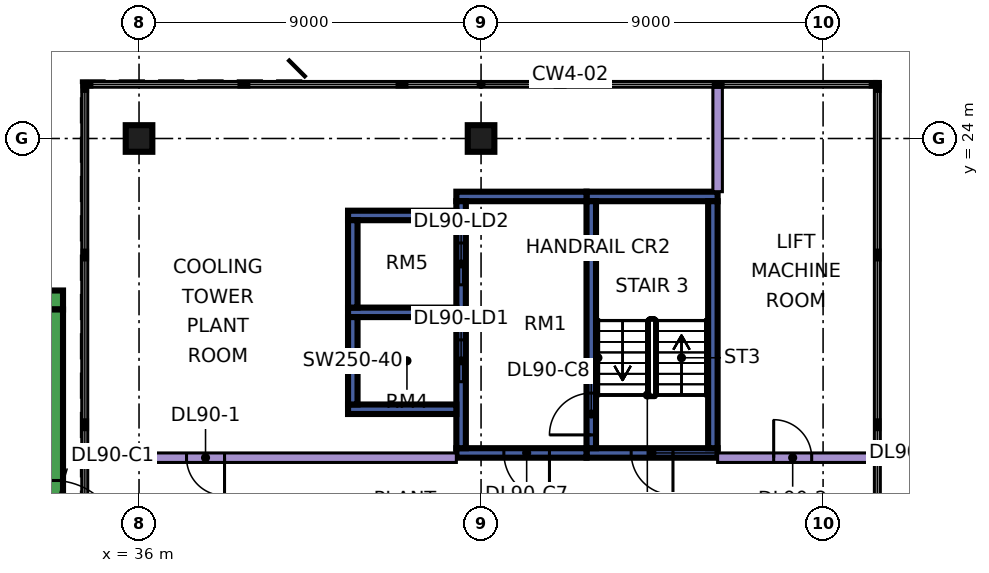
"""IFC4 building model, lengths in metres.
Left out: names, types, materials, properties, quantities, classifications, styles, units other than length and angle.
Written with IfcOpenShell. Run it as: python <this file> out.ifc"""

import sys

from ifc_helpers import new_model, si_unit, direction, frame, frame_2d, origin, origin_2d, place, context, subcontext, project, spatial, rectangle, extrude, element, fill, save


model = new_model("IFC4")
c1 = context("Model", 3, precision=1e-05, world=origin(), true_north=direction((0.0, 1.0)))
c2 = subcontext(c1, "Body", "Model", "MODEL_VIEW")
j1 = project(units=[si_unit("LENGTHUNIT", "METRE"), si_unit("PLANEANGLEUNIT", "RADIAN")], contexts=[c1])
p1 = place(None, origin())
s1 = spatial("IfcSite", under=j1, at=p1, CompositionType="ELEMENT")
p2 = place(p1, origin())
s2 = spatial("IfcBuilding", under=s1, at=p2, CompositionType="ELEMENT")
p3 = place(p2, frame((0.0, 0.0, 383.9)))
s3 = spatial("IfcBuildingStorey", under=s2, at=p3, CompositionType="ELEMENT", Elevation=383.9)
for number, where, z_axis, x_axis in (
    (1, (36.0, 24.0, 0.0), (0.0, 0.0, 1.0), (1.0, 0.0, 0.0)),
    (2, (45.0, 24.0, 0.0), (0.0, 0.0, 1.0), (1.0, 0.0, 0.0)),
):
    element("IfcColumn", number, at=place(p3, frame(where, z_axis=z_axis, x_axis=x_axis)), inside=s3, PredefinedType="COLUMN", context=c2, shape_type="SweptSolid", body=[
        extrude(rectangle(XDim=0.7, YDim=0.7, at=origin_2d()), origin(), (0.0, 0.0, 1.0), 5.0),
    ])
p4 = place(p3, frame((9.0, 19.75, 0.0), z_axis=(0.0, 0.0, 1.0), x_axis=(1.0, 0.0, 0.0)))
e3 = element("IfcWall", 3, at=p4, inside=s3, PredefinedType="SHEAR", context=c2, shape_type="SweptSolid", body=[
    extrude(rectangle(XDim=25.0, YDim=0.5, at=frame_2d((12.5, 0.0))), origin(), (0.0, 0.0, 1.0), 5.0),
])
p5 = place(p3, frame((33.75, 7.5, 0.0), z_axis=(0.0, 0.0, 1.0), x_axis=(0.0, 1.0, 0.0)))
e4 = element("IfcWall", 4, at=p5, inside=s3, PredefinedType="SHEAR", context=c2, shape_type="SweptSolid", body=[
    extrude(rectangle(XDim=12.0, YDim=0.5, at=frame_2d((6.0, 0.0))), origin(), (0.0, 0.0, 1.0), 5.0),
])
p6 = place(p5, frame((5.7, 0.0, 0.0)))
e5 = element("IfcOpeningElement", 5, at=p6, cuts=e4, PredefinedType="OPENING", context=c2, shape_type="SweptSolid", body=[
    extrude(rectangle(XDim=1.8, YDim=2.4, at=frame_2d((0.9, 1.2))), frame((0.0, 0.26, 0.0), z_axis=(0.0, -1.0, 0.0), x_axis=(1.0, 0.0, 0.0)), (0.0, 0.0, 1.0), 0.52),
])
p7 = place(p3, frame((47.775, 15.725, 0.0), z_axis=(0.0, 0.0, 1.0), x_axis=(1.0, 0.0, 0.0)))
e6 = element("IfcWall", 6, at=p7, inside=s3, PredefinedType="SHEAR", context=c2, shape_type="SweptSolid", body=[
    extrude(rectangle(XDim=3.45, YDim=0.25, at=frame_2d((1.725, 0.0))), origin(), (0.0, 0.0, 1.0), 5.0),
])
p8 = place(p7, frame((1.175, 0.0, 0.0)))
e7 = element("IfcOpeningElement", 7, at=p8, cuts=e6, PredefinedType="OPENING", context=c2, shape_type="SweptSolid", body=[
    extrude(rectangle(XDim=1.1, YDim=2.2, at=frame_2d((0.55, 1.1))), frame((0.0, 0.135, 0.0), z_axis=(0.0, -1.0, 0.0), x_axis=(1.0, 0.0, 0.0)), (0.0, 0.0, 1.0), 0.27),
])
p9 = place(p3, frame((47.775, 22.475, 0.0), z_axis=(0.0, 0.0, 1.0), x_axis=(1.0, 0.0, 0.0)))
e8 = element("IfcWall", 8, at=p9, inside=s3, PredefinedType="SHEAR", context=c2, shape_type="SweptSolid", body=[
    extrude(rectangle(XDim=3.45, YDim=0.25, at=frame_2d((1.725, 0.0))), origin(), (0.0, 0.0, 1.0), 5.0),
])
p10 = place(p3, frame((47.9, 15.85, 0.0), z_axis=(0.0, 0.0, 1.0), x_axis=(0.0, 1.0, 0.0)))
e9 = element("IfcWall", 9, at=p10, inside=s3, PredefinedType="SHEAR", context=c2, shape_type="SweptSolid", body=[
    extrude(rectangle(XDim=6.5, YDim=0.25, at=frame_2d((3.25, 0.0))), origin(), (0.0, 0.0, 1.0), 5.0),
])
p11 = place(p10, frame((0.35, 0.0, 0.0)))
e10 = element("IfcOpeningElement", 10, at=p11, cuts=e9, PredefinedType="OPENING", context=c2, shape_type="SweptSolid", body=[
    extrude(rectangle(XDim=1.1, YDim=2.2, at=frame_2d((0.55, 1.1))), frame((0.0, 0.135, 0.0), z_axis=(0.0, -1.0, 0.0), x_axis=(1.0, 0.0, 0.0)), (0.0, 0.0, 1.0), 0.27),
])
p12 = place(p3, frame((51.1, 15.85, 0.0), z_axis=(0.0, 0.0, 1.0), x_axis=(0.0, 1.0, 0.0)))
e11 = element("IfcWall", 11, at=p12, inside=s3, PredefinedType="SHEAR", context=c2, shape_type="SweptSolid", body=[
    extrude(rectangle(XDim=6.5, YDim=0.25, at=frame_2d((3.25, 0.0))), origin(), (0.0, 0.0, 1.0), 5.0),
])
p13 = place(p3, frame((44.35, 15.725, 0.0), z_axis=(0.0, 0.0, 1.0), x_axis=(1.0, 0.0, 0.0)))
e12 = element("IfcWall", 12, at=p13, inside=s3, PredefinedType="SHEAR", context=c2, shape_type="SweptSolid", body=[
    extrude(rectangle(XDim=3.425, YDim=0.25, at=frame_2d((1.712, 0.0))), origin(), (0.0, 0.0, 1.0), 5.0),
])
p14 = place(p13, frame((1.25, 0.0, 0.0)))
e13 = element("IfcOpeningElement", 13, at=p14, cuts=e12, PredefinedType="OPENING", context=c2, shape_type="SweptSolid", body=[
    extrude(rectangle(XDim=1.2, YDim=2.2, at=frame_2d((0.6, 1.1))), frame((0.0, 0.135, 0.0), z_axis=(0.0, -1.0, 0.0), x_axis=(1.0, 0.0, 0.0)), (0.0, 0.0, 1.0), 0.27),
])
p15 = place(p3, frame((44.35, 22.475, 0.0), z_axis=(0.0, 0.0, 1.0), x_axis=(1.0, 0.0, 0.0)))
e14 = element("IfcWall", 14, at=p15, inside=s3, PredefinedType="SHEAR", context=c2, shape_type="SweptSolid", body=[
    extrude(rectangle(XDim=3.425, YDim=0.25, at=frame_2d((1.712, 0.0))), origin(), (0.0, 0.0, 1.0), 5.0),
])
p16 = place(p3, frame((44.475, 15.85, 0.0), z_axis=(0.0, 0.0, 1.0), x_axis=(0.0, 1.0, 0.0)))
e15 = element("IfcWall", 15, at=p16, inside=s3, PredefinedType="SHEAR", context=c2, shape_type="SweptSolid", body=[
    extrude(rectangle(XDim=6.5, YDim=0.25, at=frame_2d((3.25, 0.0))), origin(), (0.0, 0.0, 1.0), 5.0),
])
p17 = place(p16, frame((1.75, 0.0, 0.0)))
e16 = element("IfcOpeningElement", 16, at=p17, cuts=e15, PredefinedType="OPENING", context=c2, shape_type="SweptSolid", body=[
    extrude(rectangle(XDim=1.1, YDim=2.2, at=frame_2d((0.55, 1.1))), frame((0.0, 0.135, 0.0), z_axis=(0.0, -1.0, 0.0), x_axis=(1.0, 0.0, 0.0)), (0.0, 0.0, 1.0), 0.27),
])
p18 = place(p16, frame((4.3, 0.0, 0.0)))
e17 = element("IfcOpeningElement", 17, at=p18, cuts=e15, PredefinedType="OPENING", context=c2, shape_type="SweptSolid", body=[
    extrude(rectangle(XDim=1.1, YDim=2.2, at=frame_2d((0.55, 1.1))), frame((0.0, 0.135, 0.0), z_axis=(0.0, -1.0, 0.0), x_axis=(1.0, 0.0, 0.0)), (0.0, 0.0, 1.0), 0.27),
])
for number, where, z_axis, x_axis in (
    (18, (41.5, 16.875, 0.0), (0.0, 0.0, 1.0), (1.0, 0.0, 0.0)),
    (19, (41.5, 19.425, 0.0), (0.0, 0.0, 1.0), (1.0, 0.0, 0.0)),
    (20, (41.5, 21.975, 0.0), (0.0, 0.0, 1.0), (1.0, 0.0, 0.0)),
):
    element("IfcWall", number, at=place(p3, frame(where, z_axis=z_axis, x_axis=x_axis)), inside=s3, PredefinedType="SHEAR", context=c2, shape_type="SweptSolid", body=[
        extrude(rectangle(XDim=2.85, YDim=0.25, at=frame_2d((1.425, 0.0))), origin(), (0.0, 0.0, 1.0), 5.0),
    ])
for number, where, z_axis, x_axis in (
    (21, (41.625, 17.0, 0.0), (0.0, 0.0, 1.0), (0.0, 1.0, 0.0)),
    (22, (41.625, 19.55, 0.0), (0.0, 0.0, 1.0), (0.0, 1.0, 0.0)),
):
    element("IfcWall", number, at=place(p3, frame(where, z_axis=z_axis, x_axis=x_axis)), inside=s3, PredefinedType="SHEAR", context=c2, shape_type="SweptSolid", body=[
        extrude(rectangle(XDim=2.3, YDim=0.25, at=frame_2d((1.15, 0.0))), origin(), (0.0, 0.0, 1.0), 5.0),
    ])
p19 = place(p3, frame((34.65, 15.6, 0.0), z_axis=(0.0, 0.0, 1.0), x_axis=(1.0, 0.0, 0.0)))
e23 = element("IfcWall", 23, at=p19, inside=s3, PredefinedType="PARTITIONING", context=c2, shape_type="SweptSolid", body=[
    extrude(rectangle(XDim=9.7, YDim=0.25, at=frame_2d((4.85, 0.0))), origin(), (0.0, 0.0, 1.0), 4.6),
])
p20 = place(p19, frame((2.6, 0.0, 0.0)))
e24 = element("IfcOpeningElement", 24, at=p20, cuts=e23, PredefinedType="OPENING", context=c2, shape_type="SweptSolid", body=[
    extrude(rectangle(XDim=1.0, YDim=2.1, at=frame_2d((0.5, 1.05))), frame((0.0, 0.135, 0.0), z_axis=(0.0, -1.0, 0.0), x_axis=(1.0, 0.0, 0.0)), (0.0, 0.0, 1.0), 0.27),
])
p21 = place(p3, frame((51.225, 15.6, 0.0), z_axis=(0.0, 0.0, 1.0), x_axis=(1.0, 0.0, 0.0)))
e25 = element("IfcWall", 25, at=p21, inside=s3, PredefinedType="PARTITIONING", context=c2, shape_type="SweptSolid", body=[
    extrude(rectangle(XDim=4.125, YDim=0.25, at=frame_2d((2.062, 0.0))), origin(), (0.0, 0.0, 1.0), 4.6),
])
p22 = place(p21, frame((1.475, 0.0, 0.0)))
e26 = element("IfcOpeningElement", 26, at=p22, cuts=e25, PredefinedType="OPENING", context=c2, shape_type="SweptSolid", body=[
    extrude(rectangle(XDim=1.0, YDim=2.1, at=frame_2d((0.5, 1.05))), frame((0.0, 0.135, 0.0), z_axis=(0.0, -1.0, 0.0), x_axis=(1.0, 0.0, 0.0)), (0.0, 0.0, 1.0), 0.27),
])
p23 = place(p3, frame((51.225, 22.6, 0.0), z_axis=(0.0, 0.0, 1.0), x_axis=(0.0, 1.0, 0.0)))
e27 = element("IfcWall", 27, at=p23, inside=s3, PredefinedType="PARTITIONING", context=c2, shape_type="SweptSolid", body=[
    extrude(rectangle(XDim=2.75, YDim=0.25, at=frame_2d((1.375, 0.0))), origin(), (0.0, 0.0, 1.0), 4.6),
])
p24 = place(p6, frame((1.8, 0.0, 0.0), z_axis=(0.0, 0.0, 1.0), x_axis=(-1.0, 0.0, 0.0)))
e28 = element("IfcDoor", 28, at=p24, inside=s3, OperationType="DOUBLE_DOOR_SINGLE_SWING", PredefinedType="DOOR", context=c2, shape_type="SweptSolid", body=[
    extrude(rectangle(XDim=1.8, YDim=2.4, at=frame_2d((0.9, 1.2))), frame((0.0, 0.025, 0.0), z_axis=(0.0, -1.0, 0.0), x_axis=(1.0, 0.0, 0.0)), (0.0, 0.0, 1.0), 0.05),
])
fill(e5, e28)
p25 = place(p8, origin())
e29 = element("IfcDoor", 29, at=p25, inside=s3, OperationType="SINGLE_SWING_RIGHT", PredefinedType="DOOR", context=c2, shape_type="SweptSolid", body=[
    extrude(rectangle(XDim=1.1, YDim=2.2, at=frame_2d((0.55, 1.1))), frame((0.0, 0.025, 0.0), z_axis=(0.0, -1.0, 0.0), x_axis=(1.0, 0.0, 0.0)), (0.0, 0.0, 1.0), 0.05),
])
fill(e7, e29)
p26 = place(p14, origin())
e30 = element("IfcDoor", 30, at=p26, inside=s3, OperationType="SINGLE_SWING_RIGHT", PredefinedType="DOOR", context=c2, shape_type="SweptSolid", body=[
    extrude(rectangle(XDim=1.2, YDim=2.2, at=frame_2d((0.6, 1.1))), frame((0.0, 0.025, 0.0), z_axis=(0.0, -1.0, 0.0), x_axis=(1.0, 0.0, 0.0)), (0.0, 0.0, 1.0), 0.05),
])
fill(e13, e30)
p27 = place(p11, origin())
e31 = element("IfcDoor", 31, at=p27, inside=s3, OperationType="SINGLE_SWING_LEFT", PredefinedType="DOOR", context=c2, shape_type="SweptSolid", body=[
    extrude(rectangle(XDim=1.1, YDim=2.2, at=frame_2d((0.55, 1.1))), frame((0.0, 0.025, 0.0), z_axis=(0.0, -1.0, 0.0), x_axis=(1.0, 0.0, 0.0)), (0.0, 0.0, 1.0), 0.05),
])
fill(e10, e31)
p28 = place(p17, origin())
e32 = element("IfcDoor", 32, at=p28, inside=s3, OperationType="DOUBLE_DOOR_SLIDING", PredefinedType="DOOR", context=c2, shape_type="SweptSolid", body=[
    extrude(rectangle(XDim=1.1, YDim=2.2, at=frame_2d((0.55, 1.1))), frame((0.0, 0.025, 0.0), z_axis=(0.0, -1.0, 0.0), x_axis=(1.0, 0.0, 0.0)), (0.0, 0.0, 1.0), 0.05),
])
fill(e16, e32)
p29 = place(p18, origin())
e33 = element("IfcDoor", 33, at=p29, inside=s3, OperationType="DOUBLE_DOOR_SLIDING", PredefinedType="DOOR", context=c2, shape_type="SweptSolid", body=[
    extrude(rectangle(XDim=1.1, YDim=2.2, at=frame_2d((0.55, 1.1))), frame((0.0, 0.025, 0.0), z_axis=(0.0, -1.0, 0.0), x_axis=(1.0, 0.0, 0.0)), (0.0, 0.0, 1.0), 0.05),
])
fill(e17, e33)
p30 = place(p20, origin())
e34 = element("IfcDoor", 34, at=p30, inside=s3, OperationType="SINGLE_SWING_RIGHT", PredefinedType="DOOR", context=c2, shape_type="SweptSolid", body=[
    extrude(rectangle(XDim=1.0, YDim=2.1, at=frame_2d((0.5, 1.05))), frame((0.0, 0.025, 0.0), z_axis=(0.0, -1.0, 0.0), x_axis=(1.0, 0.0, 0.0)), (0.0, 0.0, 1.0), 0.05),
])
fill(e24, e34)
p31 = place(p22, origin())
e35 = element("IfcDoor", 35, at=p31, inside=s3, OperationType="SINGLE_SWING_LEFT", PredefinedType="DOOR", context=c2, shape_type="SweptSolid", body=[
    extrude(rectangle(XDim=1.0, YDim=2.1, at=frame_2d((0.5, 1.05))), frame((0.0, 0.025, 0.0), z_axis=(0.0, -1.0, 0.0), x_axis=(1.0, 0.0, 0.0)), (0.0, 0.0, 1.0), 0.05),
])
fill(e26, e35)
save(model, sys.argv[1])
